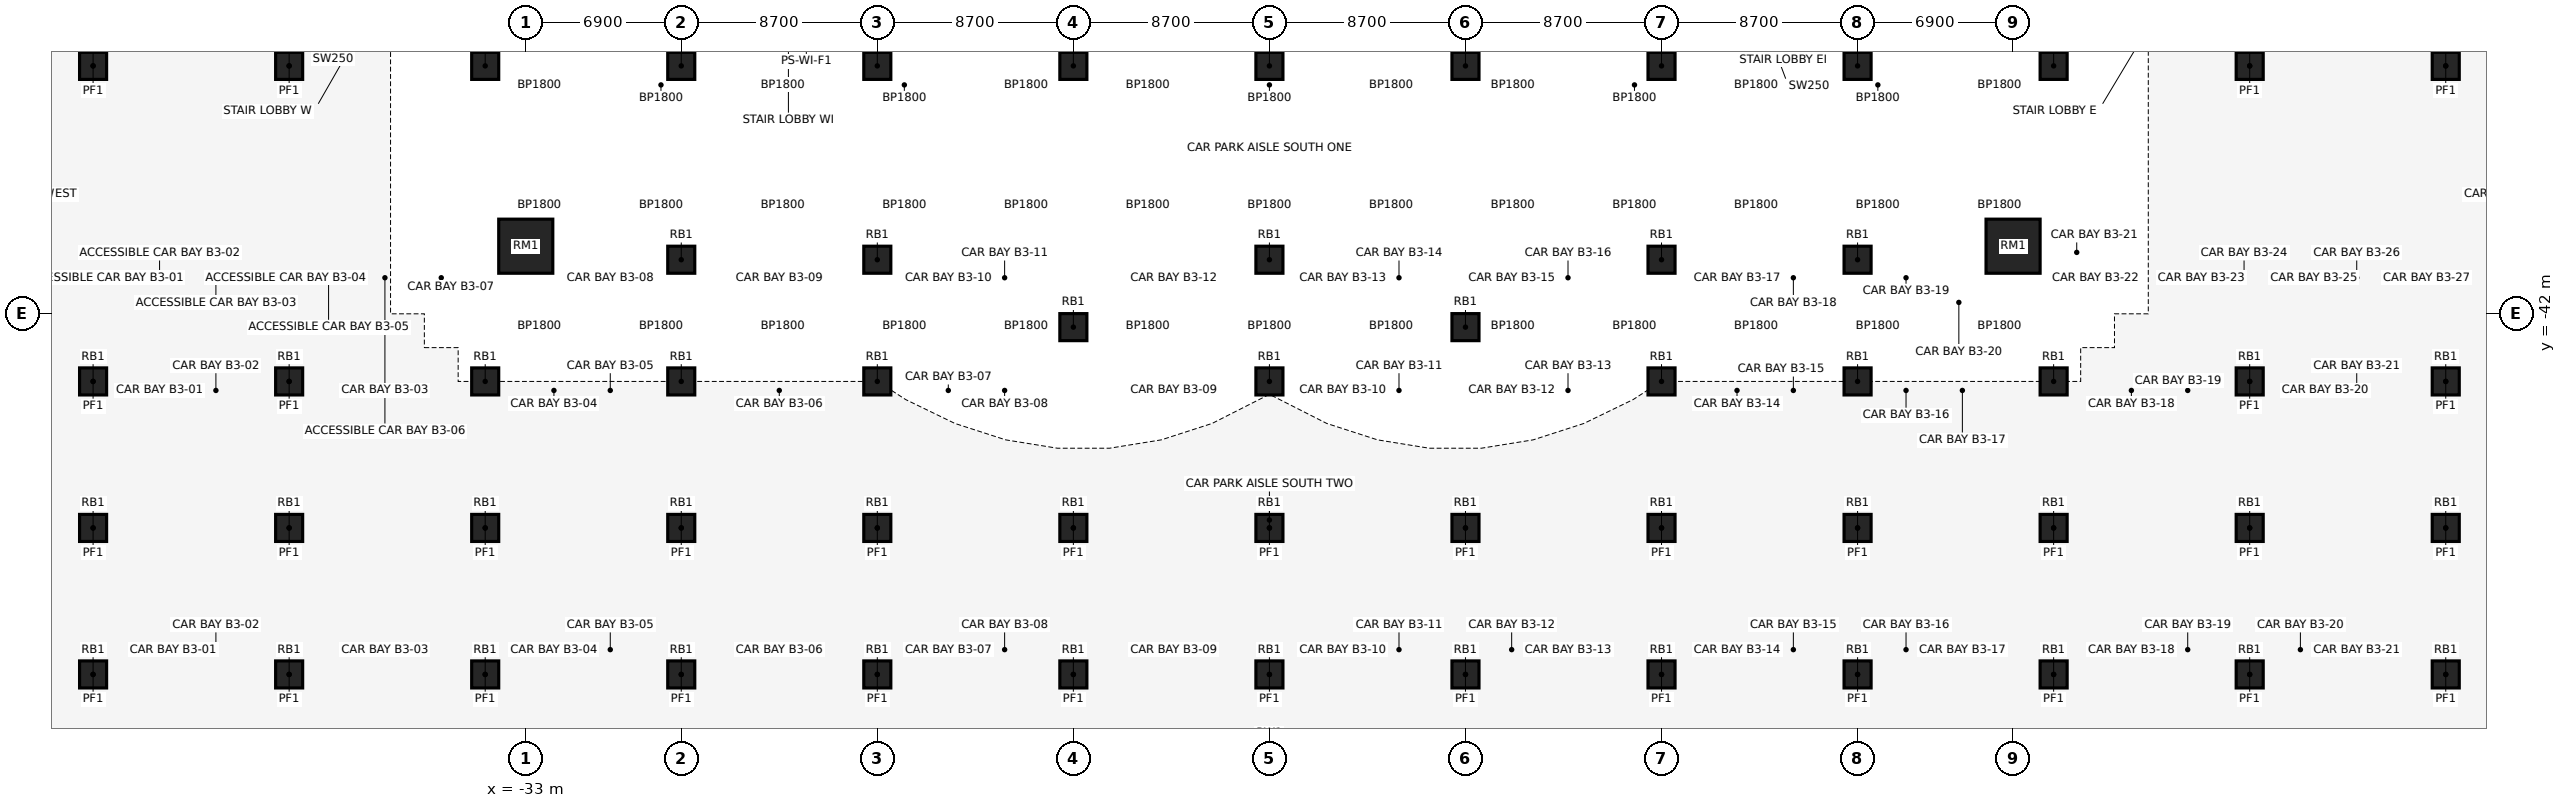
"""IFC4 building model, lengths in metres.
Left out: names, types, materials, properties, quantities, classifications, styles, units other than length and angle.
Written with IfcOpenShell. Run it as: python <this file> out.ifc"""

import sys

from ifc_helpers import new_model, si_unit, direction, frame, origin, origin_2d, place, context, subcontext, project, spatial, rectangle, extrude, element, save


model = new_model("IFC4")
c1 = context("Model", 3, precision=1e-05, world=origin(), true_north=direction((0.0, 1.0)))
c2 = subcontext(c1, "Body", "Model", "MODEL_VIEW")
j1 = project(units=[si_unit("LENGTHUNIT", "METRE"), si_unit("PLANEANGLEUNIT", "RADIAN")], contexts=[c1])
p1 = place(None, origin())
s1 = spatial("IfcSite", under=j1, at=p1, CompositionType="ELEMENT")
p2 = place(p1, origin())
s2 = spatial("IfcBuilding", under=s1, at=p2, CompositionType="ELEMENT")
p3 = place(p2, frame((0.0, 0.0, -15.0)))
s3 = spatial("IfcBuildingStorey", under=s2, at=p3, CompositionType="ELEMENT", Elevation=-15.0)
p4 = place(p3, frame((-33.0, -39.0, 0.0), z_axis=(0.0, 0.0, 1.0), x_axis=(1.0, 0.0, 0.0)))
e1 = element("IfcColumn", 1, at=p4, inside=s3, PredefinedType="COLUMN", context=c2, shape_type="SweptSolid", body=[
    extrude(rectangle(XDim=2.4, YDim=2.4, at=origin_2d()), origin(), (0.0, 0.0, 1.0), 5.0),
])
for number, where, z_axis, x_axis in (
    (2, (-26.1, -39.6, 0.0), (0.0, 0.0, 1.0), (1.0, 0.0, 0.0)),
    (3, (-17.4, -39.6, 0.0), (0.0, 0.0, 1.0), (1.0, 0.0, 0.0)),
    (4, (-8.7, -42.591, 0.0), (0.0, 0.0, 1.0), (1.0, 0.0, 0.0)),
    (5, (0.0, -39.6, 0.0), (0.0, 0.0, 1.0), (1.0, 0.0, 0.0)),
    (6, (8.7, -42.591, 0.0), (0.0, 0.0, 1.0), (1.0, 0.0, 0.0)),
    (7, (17.4, -39.6, 0.0), (0.0, 0.0, 1.0), (1.0, 0.0, 0.0)),
    (8, (26.1, -39.6, 0.0), (0.0, 0.0, 1.0), (1.0, 0.0, 0.0)),
):
    element("IfcColumn", number, at=place(p3, frame(where, z_axis=z_axis, x_axis=x_axis)), inside=s3, PredefinedType="COLUMN", context=c2, shape_type="SweptSolid", body=[
        extrude(rectangle(XDim=1.2, YDim=1.2, at=origin_2d()), origin(), (0.0, 0.0, 1.0), 5.0),
    ])
p5 = place(p3, frame((33.0, -39.0, 0.0), z_axis=(0.0, 0.0, 1.0), x_axis=(1.0, 0.0, 0.0)))
e9 = element("IfcColumn", 9, at=p5, inside=s3, PredefinedType="COLUMN", context=c2, shape_type="SweptSolid", body=[
    extrude(rectangle(XDim=2.4, YDim=2.4, at=origin_2d()), origin(), (0.0, 0.0, 1.0), 5.0),
])
for number, where, z_axis, x_axis in (
    (10, (-52.2, -31.0, -0.3), (0.0, 0.0, 1.0), (1.0, 0.0, 0.0)),
    (11, (-52.2, -45.0, -0.3), (0.0, 0.0, 1.0), (1.0, 0.0, 0.0)),
    (12, (-52.2, -51.5, -0.3), (0.0, 0.0, 1.0), (1.0, 0.0, 0.0)),
    (13, (-52.2, -58.0, -0.3), (0.0, 0.0, 1.0), (1.0, 0.0, 0.0)),
    (14, (-43.5, -31.0, -0.3), (0.0, 0.0, 1.0), (1.0, 0.0, 0.0)),
    (15, (-43.5, -45.0, -0.3), (0.0, 0.0, 1.0), (1.0, 0.0, 0.0)),
    (16, (-43.5, -51.5, -0.3), (0.0, 0.0, 1.0), (1.0, 0.0, 0.0)),
    (17, (-43.5, -58.0, -0.3), (0.0, 0.0, 1.0), (1.0, 0.0, 0.0)),
):
    element("IfcColumn", number, at=place(p3, frame(where, z_axis=z_axis, x_axis=x_axis)), inside=s3, PredefinedType="COLUMN", context=c2, shape_type="SweptSolid", body=[
        extrude(rectangle(XDim=1.2, YDim=1.2, at=origin_2d()), origin(), (0.0, 0.0, 1.0), 5.3),
    ])
for number, where, z_axis, x_axis in (
    (18, (-34.8, -31.0, 0.0), (0.0, 0.0, 1.0), (1.0, 0.0, 0.0)),
    (19, (-34.8, -45.0, 0.0), (0.0, 0.0, 1.0), (1.0, 0.0, 0.0)),
):
    element("IfcColumn", number, at=place(p3, frame(where, z_axis=z_axis, x_axis=x_axis)), inside=s3, PredefinedType="COLUMN", context=c2, shape_type="SweptSolid", body=[
        extrude(rectangle(XDim=1.2, YDim=1.2, at=origin_2d()), origin(), (0.0, 0.0, 1.0), 5.0),
    ])
for number, where, z_axis, x_axis in (
    (20, (-34.8, -51.5, -0.3), (0.0, 0.0, 1.0), (1.0, 0.0, 0.0)),
    (21, (-34.8, -58.0, -0.3), (0.0, 0.0, 1.0), (1.0, 0.0, 0.0)),
):
    element("IfcColumn", number, at=place(p3, frame(where, z_axis=z_axis, x_axis=x_axis)), inside=s3, PredefinedType="COLUMN", context=c2, shape_type="SweptSolid", body=[
        extrude(rectangle(XDim=1.2, YDim=1.2, at=origin_2d()), origin(), (0.0, 0.0, 1.0), 5.3),
    ])
for number, where, z_axis, x_axis in (
    (22, (-26.1, -31.0, 0.0), (0.0, 0.0, 1.0), (1.0, 0.0, 0.0)),
    (23, (-26.1, -45.0, 0.0), (0.0, 0.0, 1.0), (1.0, 0.0, 0.0)),
):
    element("IfcColumn", number, at=place(p3, frame(where, z_axis=z_axis, x_axis=x_axis)), inside=s3, PredefinedType="COLUMN", context=c2, shape_type="SweptSolid", body=[
        extrude(rectangle(XDim=1.2, YDim=1.2, at=origin_2d()), origin(), (0.0, 0.0, 1.0), 5.0),
    ])
for number, where, z_axis, x_axis in (
    (24, (-26.1, -51.5, -0.3), (0.0, 0.0, 1.0), (1.0, 0.0, 0.0)),
    (25, (-26.1, -58.0, -0.3), (0.0, 0.0, 1.0), (1.0, 0.0, 0.0)),
):
    element("IfcColumn", number, at=place(p3, frame(where, z_axis=z_axis, x_axis=x_axis)), inside=s3, PredefinedType="COLUMN", context=c2, shape_type="SweptSolid", body=[
        extrude(rectangle(XDim=1.2, YDim=1.2, at=origin_2d()), origin(), (0.0, 0.0, 1.0), 5.3),
    ])
for number, where, z_axis, x_axis in (
    (26, (-17.4, -31.0, 0.0), (0.0, 0.0, 1.0), (1.0, 0.0, 0.0)),
    (27, (-17.4, -45.0, 0.0), (0.0, 0.0, 1.0), (1.0, 0.0, 0.0)),
):
    element("IfcColumn", number, at=place(p3, frame(where, z_axis=z_axis, x_axis=x_axis)), inside=s3, PredefinedType="COLUMN", context=c2, shape_type="SweptSolid", body=[
        extrude(rectangle(XDim=1.2, YDim=1.2, at=origin_2d()), origin(), (0.0, 0.0, 1.0), 5.0),
    ])
for number, where, z_axis, x_axis in (
    (28, (-17.4, -51.5, -0.3), (0.0, 0.0, 1.0), (1.0, 0.0, 0.0)),
    (29, (-17.4, -58.0, -0.3), (0.0, 0.0, 1.0), (1.0, 0.0, 0.0)),
):
    element("IfcColumn", number, at=place(p3, frame(where, z_axis=z_axis, x_axis=x_axis)), inside=s3, PredefinedType="COLUMN", context=c2, shape_type="SweptSolid", body=[
        extrude(rectangle(XDim=1.2, YDim=1.2, at=origin_2d()), origin(), (0.0, 0.0, 1.0), 5.3),
    ])
p6 = place(p3, frame((-8.7, -31.0, 0.0), z_axis=(0.0, 0.0, 1.0), x_axis=(1.0, 0.0, 0.0)))
e30 = element("IfcColumn", 30, at=p6, inside=s3, PredefinedType="COLUMN", context=c2, shape_type="SweptSolid", body=[
    extrude(rectangle(XDim=1.2, YDim=1.2, at=origin_2d()), origin(), (0.0, 0.0, 1.0), 5.0),
])
for number, where, z_axis, x_axis in (
    (31, (-8.7, -51.5, -0.3), (0.0, 0.0, 1.0), (1.0, 0.0, 0.0)),
    (32, (-8.7, -58.0, -0.3), (0.0, 0.0, 1.0), (1.0, 0.0, 0.0)),
):
    element("IfcColumn", number, at=place(p3, frame(where, z_axis=z_axis, x_axis=x_axis)), inside=s3, PredefinedType="COLUMN", context=c2, shape_type="SweptSolid", body=[
        extrude(rectangle(XDim=1.2, YDim=1.2, at=origin_2d()), origin(), (0.0, 0.0, 1.0), 5.3),
    ])
for number, where, z_axis, x_axis in (
    (33, (0.0, -31.0, 0.0), (0.0, 0.0, 1.0), (1.0, 0.0, 0.0)),
    (34, (0.0, -45.0, 0.0), (0.0, 0.0, 1.0), (1.0, 0.0, 0.0)),
):
    element("IfcColumn", number, at=place(p3, frame(where, z_axis=z_axis, x_axis=x_axis)), inside=s3, PredefinedType="COLUMN", context=c2, shape_type="SweptSolid", body=[
        extrude(rectangle(XDim=1.2, YDim=1.2, at=origin_2d()), origin(), (0.0, 0.0, 1.0), 5.0),
    ])
for number, where, z_axis, x_axis in (
    (35, (0.0, -51.5, -0.3), (0.0, 0.0, 1.0), (1.0, 0.0, 0.0)),
    (36, (0.0, -58.0, -0.3), (0.0, 0.0, 1.0), (1.0, 0.0, 0.0)),
):
    element("IfcColumn", number, at=place(p3, frame(where, z_axis=z_axis, x_axis=x_axis)), inside=s3, PredefinedType="COLUMN", context=c2, shape_type="SweptSolid", body=[
        extrude(rectangle(XDim=1.2, YDim=1.2, at=origin_2d()), origin(), (0.0, 0.0, 1.0), 5.3),
    ])
p7 = place(p3, frame((8.7, -31.0, 0.0), z_axis=(0.0, 0.0, 1.0), x_axis=(1.0, 0.0, 0.0)))
e37 = element("IfcColumn", 37, at=p7, inside=s3, PredefinedType="COLUMN", context=c2, shape_type="SweptSolid", body=[
    extrude(rectangle(XDim=1.2, YDim=1.2, at=origin_2d()), origin(), (0.0, 0.0, 1.0), 5.0),
])
for number, where, z_axis, x_axis in (
    (38, (8.7, -51.5, -0.3), (0.0, 0.0, 1.0), (1.0, 0.0, 0.0)),
    (39, (8.7, -58.0, -0.3), (0.0, 0.0, 1.0), (1.0, 0.0, 0.0)),
):
    element("IfcColumn", number, at=place(p3, frame(where, z_axis=z_axis, x_axis=x_axis)), inside=s3, PredefinedType="COLUMN", context=c2, shape_type="SweptSolid", body=[
        extrude(rectangle(XDim=1.2, YDim=1.2, at=origin_2d()), origin(), (0.0, 0.0, 1.0), 5.3),
    ])
for number, where, z_axis, x_axis in (
    (40, (17.4, -31.0, 0.0), (0.0, 0.0, 1.0), (1.0, 0.0, 0.0)),
    (41, (17.4, -45.0, 0.0), (0.0, 0.0, 1.0), (1.0, 0.0, 0.0)),
):
    element("IfcColumn", number, at=place(p3, frame(where, z_axis=z_axis, x_axis=x_axis)), inside=s3, PredefinedType="COLUMN", context=c2, shape_type="SweptSolid", body=[
        extrude(rectangle(XDim=1.2, YDim=1.2, at=origin_2d()), origin(), (0.0, 0.0, 1.0), 5.0),
    ])
for number, where, z_axis, x_axis in (
    (42, (17.4, -51.5, -0.3), (0.0, 0.0, 1.0), (1.0, 0.0, 0.0)),
    (43, (17.4, -58.0, -0.3), (0.0, 0.0, 1.0), (1.0, 0.0, 0.0)),
):
    element("IfcColumn", number, at=place(p3, frame(where, z_axis=z_axis, x_axis=x_axis)), inside=s3, PredefinedType="COLUMN", context=c2, shape_type="SweptSolid", body=[
        extrude(rectangle(XDim=1.2, YDim=1.2, at=origin_2d()), origin(), (0.0, 0.0, 1.0), 5.3),
    ])
for number, where, z_axis, x_axis in (
    (44, (26.1, -31.0, 0.0), (0.0, 0.0, 1.0), (1.0, 0.0, 0.0)),
    (45, (26.1, -45.0, 0.0), (0.0, 0.0, 1.0), (1.0, 0.0, 0.0)),
):
    element("IfcColumn", number, at=place(p3, frame(where, z_axis=z_axis, x_axis=x_axis)), inside=s3, PredefinedType="COLUMN", context=c2, shape_type="SweptSolid", body=[
        extrude(rectangle(XDim=1.2, YDim=1.2, at=origin_2d()), origin(), (0.0, 0.0, 1.0), 5.0),
    ])
for number, where, z_axis, x_axis in (
    (46, (26.1, -51.5, -0.3), (0.0, 0.0, 1.0), (1.0, 0.0, 0.0)),
    (47, (26.1, -58.0, -0.3), (0.0, 0.0, 1.0), (1.0, 0.0, 0.0)),
):
    element("IfcColumn", number, at=place(p3, frame(where, z_axis=z_axis, x_axis=x_axis)), inside=s3, PredefinedType="COLUMN", context=c2, shape_type="SweptSolid", body=[
        extrude(rectangle(XDim=1.2, YDim=1.2, at=origin_2d()), origin(), (0.0, 0.0, 1.0), 5.3),
    ])
for number, where, z_axis, x_axis in (
    (48, (34.8, -31.0, 0.0), (0.0, 0.0, 1.0), (1.0, 0.0, 0.0)),
    (49, (34.8, -45.0, 0.0), (0.0, 0.0, 1.0), (1.0, 0.0, 0.0)),
):
    element("IfcColumn", number, at=place(p3, frame(where, z_axis=z_axis, x_axis=x_axis)), inside=s3, PredefinedType="COLUMN", context=c2, shape_type="SweptSolid", body=[
        extrude(rectangle(XDim=1.2, YDim=1.2, at=origin_2d()), origin(), (0.0, 0.0, 1.0), 5.0),
    ])
for number, where, z_axis, x_axis in (
    (50, (34.8, -51.5, -0.3), (0.0, 0.0, 1.0), (1.0, 0.0, 0.0)),
    (51, (34.8, -58.0, -0.3), (0.0, 0.0, 1.0), (1.0, 0.0, 0.0)),
    (52, (43.5, -31.0, -0.3), (0.0, 0.0, 1.0), (1.0, 0.0, 0.0)),
    (53, (43.5, -45.0, -0.3), (0.0, 0.0, 1.0), (1.0, 0.0, 0.0)),
    (54, (43.5, -51.5, -0.3), (0.0, 0.0, 1.0), (1.0, 0.0, 0.0)),
    (55, (43.5, -58.0, -0.3), (0.0, 0.0, 1.0), (1.0, 0.0, 0.0)),
    (56, (52.2, -31.0, -0.3), (0.0, 0.0, 1.0), (1.0, 0.0, 0.0)),
    (57, (52.2, -45.0, -0.3), (0.0, 0.0, 1.0), (1.0, 0.0, 0.0)),
    (58, (52.2, -51.5, -0.3), (0.0, 0.0, 1.0), (1.0, 0.0, 0.0)),
    (59, (52.2, -58.0, -0.3), (0.0, 0.0, 1.0), (1.0, 0.0, 0.0)),
):
    element("IfcColumn", number, at=place(p3, frame(where, z_axis=z_axis, x_axis=x_axis)), inside=s3, PredefinedType="COLUMN", context=c2, shape_type="SweptSolid", body=[
        extrude(rectangle(XDim=1.2, YDim=1.2, at=origin_2d()), origin(), (0.0, 0.0, 1.0), 5.3),
    ])
save(model, sys.argv[1])
